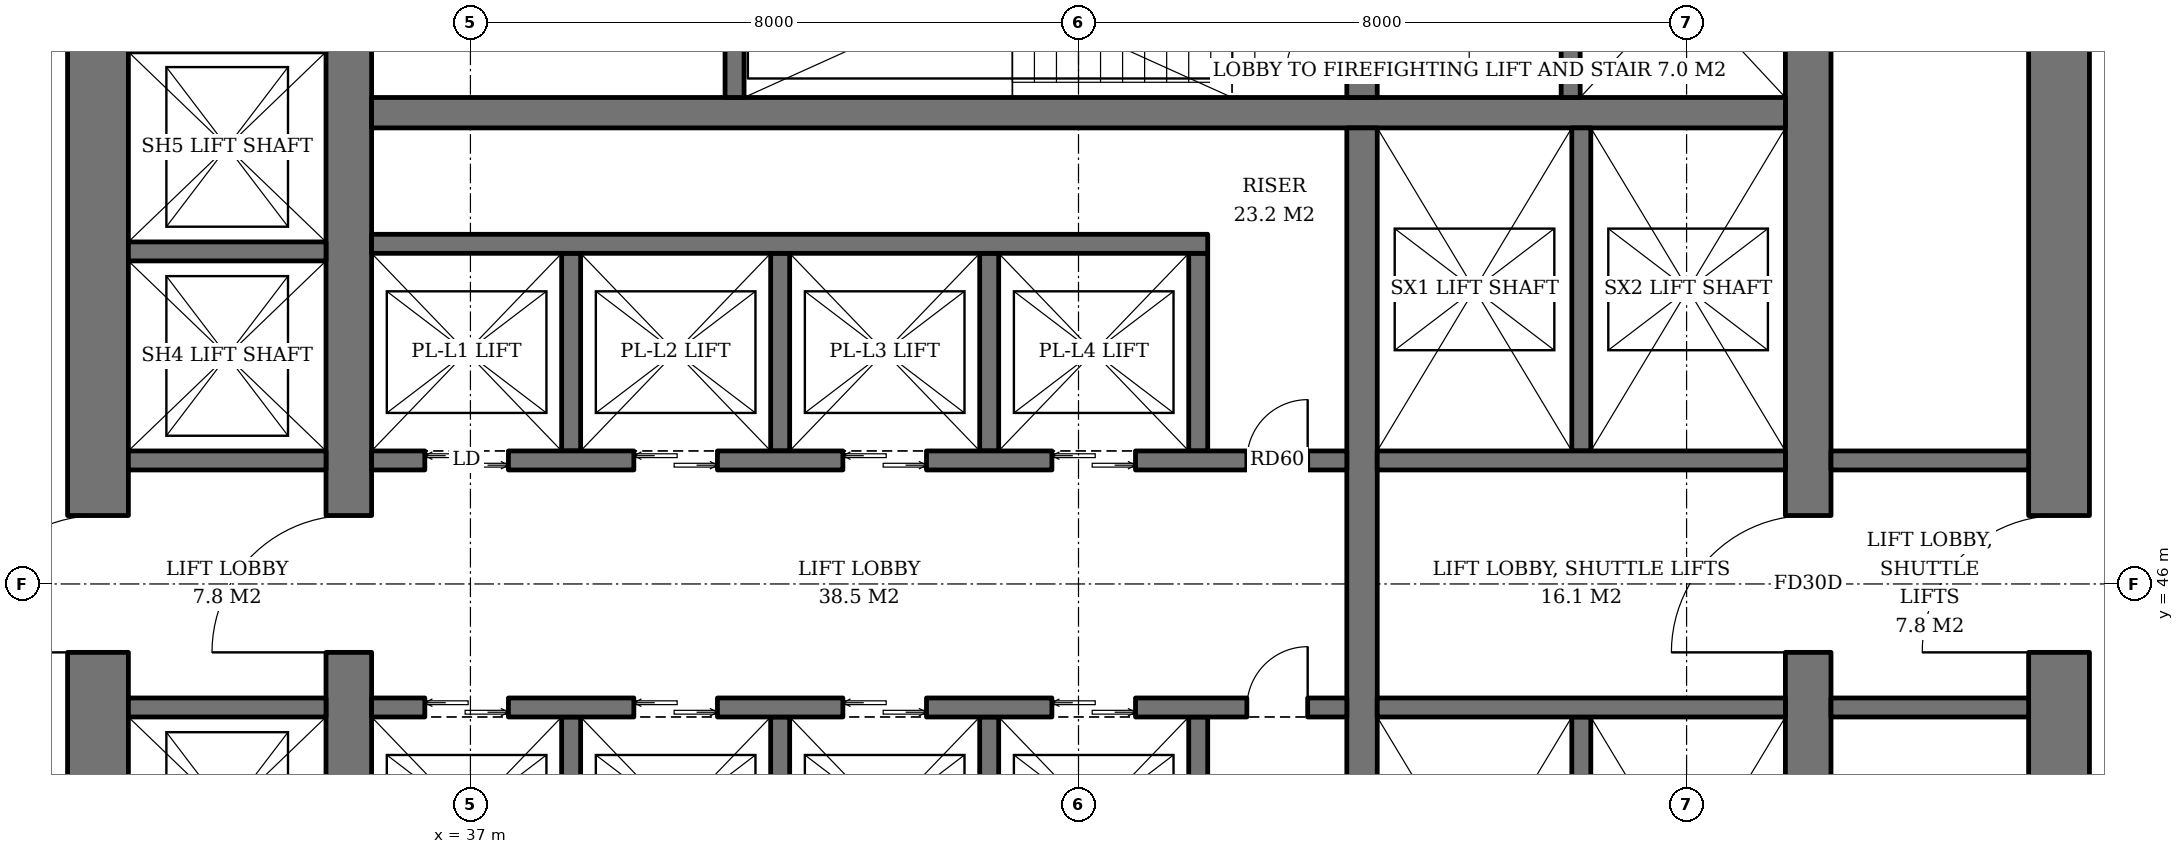
"""IFC4 building model, lengths in metres.
Left out: names, types, materials, properties, quantities, classifications, styles, units other than length and angle.
Written with IfcOpenShell. Run it as: python <this file> out.ifc"""

import sys

from ifc_helpers import new_model, si_unit, direction, frame, frame_2d, origin, place, context, subcontext, project, spatial, rectangle, extrude, element, fill, save


model = new_model("IFC4")
c1 = context("Model", 3, precision=1e-05, world=origin(), true_north=direction((0.0, 1.0)))
c2 = subcontext(c1, "Body", "Model", "MODEL_VIEW")
j1 = project(units=[si_unit("LENGTHUNIT", "METRE"), si_unit("PLANEANGLEUNIT", "RADIAN")], contexts=[c1])
p1 = place(None, origin())
s1 = spatial("IfcSite", under=j1, at=p1, CompositionType="ELEMENT")
p2 = place(p1, origin())
s2 = spatial("IfcBuilding", under=s1, at=p2, CompositionType="ELEMENT")
p3 = place(p2, frame((0.0, 0.0, 43.8)))
s3 = spatial("IfcBuildingStorey", under=s2, at=p3, CompositionType="ELEMENT", Elevation=43.8)
p4 = place(p3, frame((35.4, 36.7, 0.0), z_axis=(0.0, 0.0, 1.0), x_axis=(0.0, 1.0, 0.0)))
e1 = element("IfcWall", 1, at=p4, inside=s3, PredefinedType="SHEAR", context=c2, shape_type="SweptSolid", body=[
    extrude(rectangle(XDim=18.6, YDim=0.6, at=frame_2d((9.3, 0.0))), origin(), (0.0, 0.0, 1.0), 3.8),
])
p5 = place(p4, frame((8.4, 0.0, 0.0)))
e2 = element("IfcOpeningElement", 2, at=p5, cuts=e1, PredefinedType="OPENING", context=c2, shape_type="SweptSolid", body=[
    extrude(rectangle(XDim=1.8, YDim=2.4, at=frame_2d((0.9, 1.2))), frame((0.0, 0.31, 0.0), z_axis=(0.0, -1.0, 0.0), x_axis=(1.0, 0.0, 0.0)), (0.0, 0.0, 1.0), 0.62),
])
p6 = place(p3, frame((54.6, 36.7, 0.0), z_axis=(0.0, 0.0, 1.0), x_axis=(0.0, 1.0, 0.0)))
e3 = element("IfcWall", 3, at=p6, inside=s3, PredefinedType="SHEAR", context=c2, shape_type="SweptSolid", body=[
    extrude(rectangle(XDim=18.6, YDim=0.6, at=frame_2d((9.3, 0.0))), origin(), (0.0, 0.0, 1.0), 3.8),
])
p7 = place(p6, frame((8.4, 0.0, 0.0)))
e4 = element("IfcOpeningElement", 4, at=p7, cuts=e3, PredefinedType="OPENING", context=c2, shape_type="SweptSolid", body=[
    extrude(rectangle(XDim=1.8, YDim=2.4, at=frame_2d((0.9, 1.2))), frame((0.0, 0.31, 0.0), z_axis=(0.0, -1.0, 0.0), x_axis=(1.0, 0.0, 0.0)), (0.0, 0.0, 1.0), 0.62),
])
p8 = place(p3, frame((32.1, 33.5, 0.0), z_axis=(0.0, 0.0, 1.0), x_axis=(0.0, 1.0, 0.0)))
e5 = element("IfcWall", 5, at=p8, inside=s3, PredefinedType="SHEAR", context=c2, shape_type="SweptSolid", body=[
    extrude(rectangle(XDim=25.0, YDim=0.8, at=frame_2d((12.5, 0.0))), origin(), (0.0, 0.0, 1.0), 3.8),
])
p9 = place(p8, frame((11.6, 0.0, 0.0)))
e6 = element("IfcOpeningElement", 6, at=p9, cuts=e5, PredefinedType="OPENING", context=c2, shape_type="SweptSolid", body=[
    extrude(rectangle(XDim=1.8, YDim=2.4, at=frame_2d((0.9, 1.2))), frame((0.0, 0.41, 0.0), z_axis=(0.0, -1.0, 0.0), x_axis=(1.0, 0.0, 0.0)), (0.0, 0.0, 1.0), 0.82),
])
p10 = place(p3, frame((57.9, 33.5, 0.0), z_axis=(0.0, 0.0, 1.0), x_axis=(0.0, 1.0, 0.0)))
e7 = element("IfcWall", 7, at=p10, inside=s3, PredefinedType="SHEAR", context=c2, shape_type="SweptSolid", body=[
    extrude(rectangle(XDim=25.0, YDim=0.8, at=frame_2d((12.5, 0.0))), origin(), (0.0, 0.0, 1.0), 3.8),
])
p11 = place(p10, frame((11.6, 0.0, 0.0)))
e8 = element("IfcOpeningElement", 8, at=p11, cuts=e7, PredefinedType="OPENING", context=c2, shape_type="SweptSolid", body=[
    extrude(rectangle(XDim=1.8, YDim=2.4, at=frame_2d((0.9, 1.2))), frame((0.0, 0.41, 0.0), z_axis=(0.0, -1.0, 0.0), x_axis=(1.0, 0.0, 0.0)), (0.0, 0.0, 1.0), 0.82),
])
p12 = place(p3, frame((35.7, 52.2, 0.0), z_axis=(0.0, 0.0, 1.0), x_axis=(1.0, 0.0, 0.0)))
e9 = element("IfcWall", 9, at=p12, inside=s3, PredefinedType="SHEAR", context=c2, shape_type="SweptSolid", body=[
    extrude(rectangle(XDim=18.6, YDim=0.4, at=frame_2d((9.3, 0.0))), origin(), (0.0, 0.0, 1.0), 3.8),
])
p13 = place(p3, frame((48.73, 40.0, 0.0), z_axis=(0.0, 0.0, 1.0), x_axis=(0.0, 1.0, 0.0)))
e10 = element("IfcWall", 10, at=p13, inside=s3, PredefinedType="SHEAR", context=c2, shape_type="SweptSolid", body=[
    extrude(rectangle(XDim=12.0, YDim=0.4, at=frame_2d((6.0, 0.0))), origin(), (0.0, 0.0, 1.0), 3.8),
])
p14 = place(p3, frame((48.73, 52.4, 0.0), z_axis=(0.0, 0.0, 1.0), x_axis=(0.0, 1.0, 0.0)))
e11 = element("IfcWall", 11, at=p14, inside=s3, PredefinedType="SHEAR", context=c2, shape_type="SweptSolid", body=[
    extrude(rectangle(XDim=2.9, YDim=0.4, at=frame_2d((1.45, 0.0))), origin(), (0.0, 0.0, 1.0), 3.8),
])
p15 = place(p14, frame((0.3, 0.0, 0.0)))
e12 = element("IfcOpeningElement", 12, at=p15, cuts=e11, PredefinedType="OPENING", context=c2, shape_type="SweptSolid", body=[
    extrude(rectangle(XDim=1.0, YDim=2.1, at=frame_2d((0.5, 1.05))), frame((0.0, 0.21, 0.0), z_axis=(0.0, -1.0, 0.0), x_axis=(1.0, 0.0, 0.0)), (0.0, 0.0, 1.0), 0.42),
])
p16 = place(p3, frame((40.475, 52.4, 0.0), z_axis=(0.0, 0.0, 1.0), x_axis=(0.0, 1.0, 0.0)))
e13 = element("IfcWall", 13, at=p16, inside=s3, PredefinedType="SHEAR", context=c2, shape_type="SweptSolid", body=[
    extrude(rectangle(XDim=2.9, YDim=0.25, at=frame_2d((1.45, 0.0))), origin(), (0.0, 0.0, 1.0), 3.8),
])
p17 = place(p3, frame((51.475, 52.4, 0.0), z_axis=(0.0, 0.0, 1.0), x_axis=(0.0, 1.0, 0.0)))
e14 = element("IfcWall", 14, at=p17, inside=s3, PredefinedType="SHEAR", context=c2, shape_type="SweptSolid", body=[
    extrude(rectangle(XDim=2.9, YDim=0.25, at=frame_2d((1.45, 0.0))), origin(), (0.0, 0.0, 1.0), 3.8),
])
p18 = place(p17, frame((0.8, 0.0, 0.0)))
e15 = element("IfcOpeningElement", 15, at=p18, cuts=e14, PredefinedType="OPENING", context=c2, shape_type="SweptSolid", body=[
    extrude(rectangle(XDim=1.3, YDim=2.2, at=frame_2d((0.65, 1.1))), frame((0.0, 0.135, 0.0), z_axis=(0.0, -1.0, 0.0), x_axis=(1.0, 0.0, 0.0)), (0.0, 0.0, 1.0), 0.27),
])
for number, where, z_axis, x_axis in (
    (16, (38.325, 47.75, 0.0), (0.0, 0.0, 1.0), (0.0, 1.0, 0.0)),
    (17, (41.075, 47.75, 0.0), (0.0, 0.0, 1.0), (0.0, 1.0, 0.0)),
    (18, (43.825, 47.75, 0.0), (0.0, 0.0, 1.0), (0.0, 1.0, 0.0)),
    (19, (46.575, 47.75, 0.0), (0.0, 0.0, 1.0), (0.0, 1.0, 0.0)),
):
    element("IfcWall", number, at=place(p3, frame(where, z_axis=z_axis, x_axis=x_axis)), inside=s3, PredefinedType="SHEAR", context=c2, shape_type="SweptSolid", body=[
        extrude(rectangle(XDim=2.6, YDim=0.25, at=frame_2d((1.3, 0.0))), origin(), (0.0, 0.0, 1.0), 3.8),
    ])
p19 = place(p3, frame((35.7, 50.475, 0.0), z_axis=(0.0, 0.0, 1.0), x_axis=(1.0, 0.0, 0.0)))
e20 = element("IfcWall", 20, at=p19, inside=s3, PredefinedType="SHEAR", context=c2, shape_type="SweptSolid", body=[
    extrude(rectangle(XDim=11.0, YDim=0.25, at=frame_2d((5.5, 0.0))), origin(), (0.0, 0.0, 1.0), 3.8),
])
p20 = place(p3, frame((35.7, 47.625, 0.0), z_axis=(0.0, 0.0, 1.0), x_axis=(1.0, 0.0, 0.0)))
e21 = element("IfcWall", 21, at=p20, inside=s3, PredefinedType="SHEAR", context=c2, shape_type="SweptSolid", body=[
    extrude(rectangle(XDim=12.83, YDim=0.25, at=frame_2d((6.415, 0.0))), origin(), (0.0, 0.0, 1.0), 3.8),
])
p21 = place(p20, frame((0.7, 0.0, 0.0)))
e22 = element("IfcOpeningElement", 22, at=p21, cuts=e21, PredefinedType="OPENING", context=c2, shape_type="SweptSolid", body=[
    extrude(rectangle(XDim=1.1, YDim=2.2, at=frame_2d((0.55, 1.1))), frame((0.0, 0.135, 0.0), z_axis=(0.0, -1.0, 0.0), x_axis=(1.0, 0.0, 0.0)), (0.0, 0.0, 1.0), 0.27),
])
p22 = place(p20, frame((3.45, 0.0, 0.0)))
e23 = element("IfcOpeningElement", 23, at=p22, cuts=e21, PredefinedType="OPENING", context=c2, shape_type="SweptSolid", body=[
    extrude(rectangle(XDim=1.1, YDim=2.2, at=frame_2d((0.55, 1.1))), frame((0.0, 0.135, 0.0), z_axis=(0.0, -1.0, 0.0), x_axis=(1.0, 0.0, 0.0)), (0.0, 0.0, 1.0), 0.27),
])
p23 = place(p20, frame((6.2, 0.0, 0.0)))
e24 = element("IfcOpeningElement", 24, at=p23, cuts=e21, PredefinedType="OPENING", context=c2, shape_type="SweptSolid", body=[
    extrude(rectangle(XDim=1.1, YDim=2.2, at=frame_2d((0.55, 1.1))), frame((0.0, 0.135, 0.0), z_axis=(0.0, -1.0, 0.0), x_axis=(1.0, 0.0, 0.0)), (0.0, 0.0, 1.0), 0.27),
])
p24 = place(p20, frame((8.95, 0.0, 0.0)))
e25 = element("IfcOpeningElement", 25, at=p24, cuts=e21, PredefinedType="OPENING", context=c2, shape_type="SweptSolid", body=[
    extrude(rectangle(XDim=1.1, YDim=2.2, at=frame_2d((0.55, 1.1))), frame((0.0, 0.135, 0.0), z_axis=(0.0, -1.0, 0.0), x_axis=(1.0, 0.0, 0.0)), (0.0, 0.0, 1.0), 0.27),
])
p25 = place(p20, frame((11.515, 0.0, 0.0)))
e26 = element("IfcOpeningElement", 26, at=p25, cuts=e21, PredefinedType="OPENING", context=c2, shape_type="SweptSolid", body=[
    extrude(rectangle(XDim=0.8, YDim=2.0, at=frame_2d((0.4, 1.0))), frame((0.0, 0.135, 0.0), z_axis=(0.0, -1.0, 0.0), x_axis=(1.0, 0.0, 0.0)), (0.0, 0.0, 1.0), 0.27),
])
for number, where, z_axis, x_axis in (
    (27, (38.325, 44.25, 0.0), (0.0, 0.0, 1.0), (0.0, -1.0, 0.0)),
    (28, (41.075, 44.25, 0.0), (0.0, 0.0, 1.0), (0.0, -1.0, 0.0)),
    (29, (43.825, 44.25, 0.0), (0.0, 0.0, 1.0), (0.0, -1.0, 0.0)),
    (30, (46.575, 44.25, 0.0), (0.0, 0.0, 1.0), (0.0, -1.0, 0.0)),
):
    element("IfcWall", number, at=place(p3, frame(where, z_axis=z_axis, x_axis=x_axis)), inside=s3, PredefinedType="SHEAR", context=c2, shape_type="SweptSolid", body=[
        extrude(rectangle(XDim=2.6, YDim=0.25, at=frame_2d((1.3, 0.0))), origin(), (0.0, 0.0, 1.0), 3.8),
    ])
p26 = place(p3, frame((35.7, 44.375, 0.0), z_axis=(0.0, 0.0, 1.0), x_axis=(1.0, 0.0, 0.0)))
e31 = element("IfcWall", 31, at=p26, inside=s3, PredefinedType="SHEAR", context=c2, shape_type="SweptSolid", body=[
    extrude(rectangle(XDim=12.83, YDim=0.25, at=frame_2d((6.415, 0.0))), origin(), (0.0, 0.0, 1.0), 3.8),
])
p27 = place(p26, frame((0.7, 0.0, 0.0)))
e32 = element("IfcOpeningElement", 32, at=p27, cuts=e31, PredefinedType="OPENING", context=c2, shape_type="SweptSolid", body=[
    extrude(rectangle(XDim=1.1, YDim=2.2, at=frame_2d((0.55, 1.1))), frame((0.0, 0.135, 0.0), z_axis=(0.0, -1.0, 0.0), x_axis=(1.0, 0.0, 0.0)), (0.0, 0.0, 1.0), 0.27),
])
p28 = place(p26, frame((3.45, 0.0, 0.0)))
e33 = element("IfcOpeningElement", 33, at=p28, cuts=e31, PredefinedType="OPENING", context=c2, shape_type="SweptSolid", body=[
    extrude(rectangle(XDim=1.1, YDim=2.2, at=frame_2d((0.55, 1.1))), frame((0.0, 0.135, 0.0), z_axis=(0.0, -1.0, 0.0), x_axis=(1.0, 0.0, 0.0)), (0.0, 0.0, 1.0), 0.27),
])
p29 = place(p26, frame((6.2, 0.0, 0.0)))
e34 = element("IfcOpeningElement", 34, at=p29, cuts=e31, PredefinedType="OPENING", context=c2, shape_type="SweptSolid", body=[
    extrude(rectangle(XDim=1.1, YDim=2.2, at=frame_2d((0.55, 1.1))), frame((0.0, 0.135, 0.0), z_axis=(0.0, -1.0, 0.0), x_axis=(1.0, 0.0, 0.0)), (0.0, 0.0, 1.0), 0.27),
])
p30 = place(p26, frame((8.95, 0.0, 0.0)))
e35 = element("IfcOpeningElement", 35, at=p30, cuts=e31, PredefinedType="OPENING", context=c2, shape_type="SweptSolid", body=[
    extrude(rectangle(XDim=1.1, YDim=2.2, at=frame_2d((0.55, 1.1))), frame((0.0, 0.135, 0.0), z_axis=(0.0, -1.0, 0.0), x_axis=(1.0, 0.0, 0.0)), (0.0, 0.0, 1.0), 0.27),
])
p31 = place(p26, frame((11.515, 0.0, 0.0)))
e36 = element("IfcOpeningElement", 36, at=p31, cuts=e31, PredefinedType="OPENING", context=c2, shape_type="SweptSolid", body=[
    extrude(rectangle(XDim=0.8, YDim=2.0, at=frame_2d((0.4, 1.0))), frame((0.0, 0.135, 0.0), z_axis=(0.0, -1.0, 0.0), x_axis=(1.0, 0.0, 0.0)), (0.0, 0.0, 1.0), 0.27),
])
p32 = place(p3, frame((51.615, 47.75, 0.0), z_axis=(0.0, 0.0, 1.0), x_axis=(0.0, 1.0, 0.0)))
e37 = element("IfcWall", 37, at=p32, inside=s3, PredefinedType="SHEAR", context=c2, shape_type="SweptSolid", body=[
    extrude(rectangle(XDim=4.25, YDim=0.25, at=frame_2d((2.125, 0.0))), origin(), (0.0, 0.0, 1.0), 3.8),
])
p33 = place(p3, frame((48.93, 47.625, 0.0), z_axis=(0.0, 0.0, 1.0), x_axis=(1.0, 0.0, 0.0)))
e38 = element("IfcWall", 38, at=p33, inside=s3, PredefinedType="SHEAR", context=c2, shape_type="SweptSolid", body=[
    extrude(rectangle(XDim=5.37, YDim=0.25, at=frame_2d((2.685, 0.0))), origin(), (0.0, 0.0, 1.0), 3.8),
])
p34 = place(p3, frame((51.615, 44.25, 0.0), z_axis=(0.0, 0.0, 1.0), x_axis=(0.0, -1.0, 0.0)))
e39 = element("IfcWall", 39, at=p34, inside=s3, PredefinedType="SHEAR", context=c2, shape_type="SweptSolid", body=[
    extrude(rectangle(XDim=4.25, YDim=0.25, at=frame_2d((2.125, 0.0))), origin(), (0.0, 0.0, 1.0), 3.8),
])
p35 = place(p3, frame((48.93, 44.375, 0.0), z_axis=(0.0, 0.0, 1.0), x_axis=(1.0, 0.0, 0.0)))
e40 = element("IfcWall", 40, at=p35, inside=s3, PredefinedType="SHEAR", context=c2, shape_type="SweptSolid", body=[
    extrude(rectangle(XDim=5.37, YDim=0.25, at=frame_2d((2.685, 0.0))), origin(), (0.0, 0.0, 1.0), 3.8),
])
for number, where, z_axis, x_axis in (
    (41, (32.5, 44.375, 0.0), (0.0, 0.0, 1.0), (1.0, 0.0, 0.0)),
    (42, (32.5, 47.625, 0.0), (0.0, 0.0, 1.0), (1.0, 0.0, 0.0)),
    (43, (32.5, 50.375, 0.0), (0.0, 0.0, 1.0), (1.0, 0.0, 0.0)),
):
    element("IfcWall", number, at=place(p3, frame(where, z_axis=z_axis, x_axis=x_axis)), inside=s3, PredefinedType="SHEAR", context=c2, shape_type="SweptSolid", body=[
        extrude(rectangle(XDim=2.6, YDim=0.25, at=frame_2d((1.3, 0.0))), origin(), (0.0, 0.0, 1.0), 3.8),
    ])
for number, where, z_axis, x_axis in (
    (44, (54.9, 44.375, 0.0), (0.0, 0.0, 1.0), (1.0, 0.0, 0.0)),
    (45, (54.9, 47.625, 0.0), (0.0, 0.0, 1.0), (1.0, 0.0, 0.0)),
):
    element("IfcWall", number, at=place(p3, frame(where, z_axis=z_axis, x_axis=x_axis)), inside=s3, PredefinedType="SOLIDWALL", context=c2, shape_type="SweptSolid", body=[
        extrude(rectangle(XDim=2.6, YDim=0.25, at=frame_2d((1.3, 0.0))), origin(), (0.0, 0.0, 1.0), 3.62),
    ])
p36 = place(p21, origin())
e46 = element("IfcDoor", 46, at=p36, inside=s3, OperationType="DOUBLE_DOOR_SLIDING", PredefinedType="DOOR", context=c2, shape_type="SweptSolid", body=[
    extrude(rectangle(XDim=1.1, YDim=2.2, at=frame_2d((0.55, 1.1))), frame((0.0, 0.025, 0.0), z_axis=(0.0, -1.0, 0.0), x_axis=(1.0, 0.0, 0.0)), (0.0, 0.0, 1.0), 0.05),
])
fill(e22, e46)
p37 = place(p22, origin())
e47 = element("IfcDoor", 47, at=p37, inside=s3, OperationType="DOUBLE_DOOR_SLIDING", PredefinedType="DOOR", context=c2, shape_type="SweptSolid", body=[
    extrude(rectangle(XDim=1.1, YDim=2.2, at=frame_2d((0.55, 1.1))), frame((0.0, 0.025, 0.0), z_axis=(0.0, -1.0, 0.0), x_axis=(1.0, 0.0, 0.0)), (0.0, 0.0, 1.0), 0.05),
])
fill(e23, e47)
p38 = place(p23, origin())
e48 = element("IfcDoor", 48, at=p38, inside=s3, OperationType="DOUBLE_DOOR_SLIDING", PredefinedType="DOOR", context=c2, shape_type="SweptSolid", body=[
    extrude(rectangle(XDim=1.1, YDim=2.2, at=frame_2d((0.55, 1.1))), frame((0.0, 0.025, 0.0), z_axis=(0.0, -1.0, 0.0), x_axis=(1.0, 0.0, 0.0)), (0.0, 0.0, 1.0), 0.05),
])
fill(e24, e48)
p39 = place(p24, origin())
e49 = element("IfcDoor", 49, at=p39, inside=s3, OperationType="DOUBLE_DOOR_SLIDING", PredefinedType="DOOR", context=c2, shape_type="SweptSolid", body=[
    extrude(rectangle(XDim=1.1, YDim=2.2, at=frame_2d((0.55, 1.1))), frame((0.0, 0.025, 0.0), z_axis=(0.0, -1.0, 0.0), x_axis=(1.0, 0.0, 0.0)), (0.0, 0.0, 1.0), 0.05),
])
fill(e25, e49)
p40 = place(p25, origin())
e50 = element("IfcDoor", 50, at=p40, inside=s3, OperationType="SINGLE_SWING_RIGHT", PredefinedType="DOOR", context=c2, shape_type="SweptSolid", body=[
    extrude(rectangle(XDim=0.8, YDim=2.0, at=frame_2d((0.4, 1.0))), frame((0.0, 0.025, 0.0), z_axis=(0.0, -1.0, 0.0), x_axis=(1.0, 0.0, 0.0)), (0.0, 0.0, 1.0), 0.05),
])
fill(e26, e50)
p41 = place(p27, origin())
e51 = element("IfcDoor", 51, at=p41, inside=s3, OperationType="DOUBLE_DOOR_SLIDING", PredefinedType="DOOR", context=c2, shape_type="SweptSolid", body=[
    extrude(rectangle(XDim=1.1, YDim=2.2, at=frame_2d((0.55, 1.1))), frame((0.0, 0.025, 0.0), z_axis=(0.0, -1.0, 0.0), x_axis=(1.0, 0.0, 0.0)), (0.0, 0.0, 1.0), 0.05),
])
fill(e32, e51)
p42 = place(p28, origin())
e52 = element("IfcDoor", 52, at=p42, inside=s3, OperationType="DOUBLE_DOOR_SLIDING", PredefinedType="DOOR", context=c2, shape_type="SweptSolid", body=[
    extrude(rectangle(XDim=1.1, YDim=2.2, at=frame_2d((0.55, 1.1))), frame((0.0, 0.025, 0.0), z_axis=(0.0, -1.0, 0.0), x_axis=(1.0, 0.0, 0.0)), (0.0, 0.0, 1.0), 0.05),
])
fill(e33, e52)
p43 = place(p29, origin())
e53 = element("IfcDoor", 53, at=p43, inside=s3, OperationType="DOUBLE_DOOR_SLIDING", PredefinedType="DOOR", context=c2, shape_type="SweptSolid", body=[
    extrude(rectangle(XDim=1.1, YDim=2.2, at=frame_2d((0.55, 1.1))), frame((0.0, 0.025, 0.0), z_axis=(0.0, -1.0, 0.0), x_axis=(1.0, 0.0, 0.0)), (0.0, 0.0, 1.0), 0.05),
])
fill(e34, e53)
p44 = place(p30, origin())
e54 = element("IfcDoor", 54, at=p44, inside=s3, OperationType="DOUBLE_DOOR_SLIDING", PredefinedType="DOOR", context=c2, shape_type="SweptSolid", body=[
    extrude(rectangle(XDim=1.1, YDim=2.2, at=frame_2d((0.55, 1.1))), frame((0.0, 0.025, 0.0), z_axis=(0.0, -1.0, 0.0), x_axis=(1.0, 0.0, 0.0)), (0.0, 0.0, 1.0), 0.05),
])
fill(e35, e54)
p45 = place(p31, origin())
e55 = element("IfcDoor", 55, at=p45, inside=s3, OperationType="SINGLE_SWING_RIGHT", PredefinedType="DOOR", context=c2, shape_type="SweptSolid", body=[
    extrude(rectangle(XDim=0.8, YDim=2.0, at=frame_2d((0.4, 1.0))), frame((0.0, 0.025, 0.0), z_axis=(0.0, -1.0, 0.0), x_axis=(1.0, 0.0, 0.0)), (0.0, 0.0, 1.0), 0.05),
])
fill(e36, e55)
p46 = place(p15, origin())
e56 = element("IfcDoor", 56, at=p46, inside=s3, OperationType="SINGLE_SWING_LEFT", PredefinedType="DOOR", context=c2, shape_type="SweptSolid", body=[
    extrude(rectangle(XDim=1.0, YDim=2.1, at=frame_2d((0.5, 1.05))), frame((0.0, 0.025, 0.0), z_axis=(0.0, -1.0, 0.0), x_axis=(1.0, 0.0, 0.0)), (0.0, 0.0, 1.0), 0.05),
])
fill(e12, e56)
p47 = place(p5, origin())
e57 = element("IfcDoor", 57, at=p47, inside=s3, OperationType="DOUBLE_DOOR_SINGLE_SWING", PredefinedType="DOOR", context=c2, shape_type="SweptSolid", body=[
    extrude(rectangle(XDim=1.8, YDim=2.4, at=frame_2d((0.9, 1.2))), frame((0.0, 0.025, 0.0), z_axis=(0.0, -1.0, 0.0), x_axis=(1.0, 0.0, 0.0)), (0.0, 0.0, 1.0), 0.05),
])
fill(e2, e57)
p48 = place(p7, origin())
e58 = element("IfcDoor", 58, at=p48, inside=s3, OperationType="DOUBLE_DOOR_SINGLE_SWING", PredefinedType="DOOR", context=c2, shape_type="SweptSolid", body=[
    extrude(rectangle(XDim=1.8, YDim=2.4, at=frame_2d((0.9, 1.2))), frame((0.0, 0.025, 0.0), z_axis=(0.0, -1.0, 0.0), x_axis=(1.0, 0.0, 0.0)), (0.0, 0.0, 1.0), 0.05),
])
fill(e4, e58)
p49 = place(p9, origin())
e59 = element("IfcDoor", 59, at=p49, inside=s3, OperationType="DOUBLE_DOOR_SINGLE_SWING", PredefinedType="DOOR", context=c2, shape_type="SweptSolid", body=[
    extrude(rectangle(XDim=1.8, YDim=2.4, at=frame_2d((0.9, 1.2))), frame((0.0, 0.025, 0.0), z_axis=(0.0, -1.0, 0.0), x_axis=(1.0, 0.0, 0.0)), (0.0, 0.0, 1.0), 0.05),
])
fill(e6, e59)
p50 = place(p11, origin())
e60 = element("IfcDoor", 60, at=p50, inside=s3, OperationType="DOUBLE_DOOR_SINGLE_SWING", PredefinedType="DOOR", context=c2, shape_type="SweptSolid", body=[
    extrude(rectangle(XDim=1.8, YDim=2.4, at=frame_2d((0.9, 1.2))), frame((0.0, 0.025, 0.0), z_axis=(0.0, -1.0, 0.0), x_axis=(1.0, 0.0, 0.0)), (0.0, 0.0, 1.0), 0.05),
])
fill(e8, e60)
save(model, sys.argv[1])
